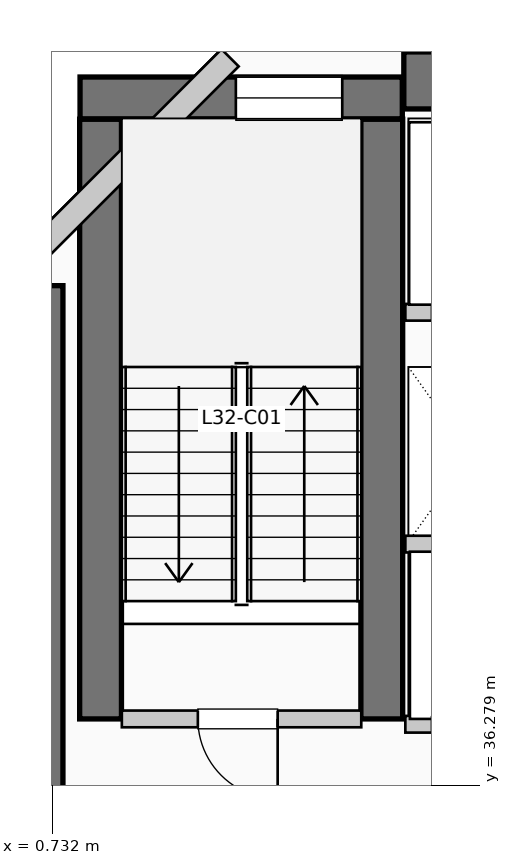
"""IFC4 building model, lengths in metres.
Left out: names, types, materials, properties, quantities, classifications, styles, units other than length and angle.
Written with IfcOpenShell. Run it as: python <this file> out.ifc"""

import sys

from ifc_helpers import new_model, si_unit, direction, frame, frame_2d, origin, place, context, subcontext, project, spatial, rectangle, extrude, element, fill, save


model = new_model("IFC4")
c1 = context("Model", 3, precision=1e-05, world=origin(), true_north=direction((0.0, 1.0)))
c2 = subcontext(c1, "Body", "Model", "MODEL_VIEW")
j1 = project(units=[si_unit("LENGTHUNIT", "METRE"), si_unit("PLANEANGLEUNIT", "RADIAN")], contexts=[c1])
p1 = place(None, origin())
s1 = spatial("IfcSite", under=j1, at=p1, CompositionType="ELEMENT")
p2 = place(p1, origin())
s2 = spatial("IfcBuilding", under=s1, at=p2, CompositionType="ELEMENT")
p3 = place(p2, frame((0.0, 0.0, 134.97)))
s3 = spatial("IfcBuildingStorey", under=s2, at=p3, CompositionType="ELEMENT", Elevation=134.97)
p4 = place(p3, frame((5.36, 45.55, 0.0), z_axis=(0.0, 0.0, 1.0), x_axis=(1.0, 0.0, 0.0)))
e1 = element("IfcWall", 1, at=p4, inside=s3, PredefinedType="SHEAR", context=c2, shape_type="SweptSolid", body=[
    extrude(rectangle(XDim=13.98, YDim=0.75, at=frame_2d((6.99, 0.0))), origin(), (0.0, 0.0, 1.0), 3.96),
])
p5 = place(p3, frame((0.5, 34.95, 0.0), z_axis=(0.0, 0.0, 1.0), x_axis=(0.0, 1.0, 0.0)))
e2 = element("IfcWall", 2, at=p5, inside=s3, PredefinedType="SHEAR", context=c2, shape_type="SweptSolid", body=[
    extrude(rectangle(XDim=7.9, YDim=0.75, at=frame_2d((3.95, 0.0))), origin(), (0.0, 0.0, 1.0), 3.96),
])
for number, where, z_axis, x_axis in (
    (3, (1.37, 37.15, 0.0), (0.0, 0.0, 1.0), (0.0, 1.0, 0.0)),
    (4, (5.07, 37.15, 0.0), (0.0, 0.0, 1.0), (0.0, 1.0, 0.0)),
):
    element("IfcWall", number, at=place(p3, frame(where, z_axis=z_axis, x_axis=x_axis)), inside=s3, PredefinedType="SHEAR", context=c2, shape_type="SweptSolid", body=[
        extrude(rectangle(XDim=7.89, YDim=0.55, at=frame_2d((3.945, 0.0))), origin(), (0.0, 0.0, 1.0), 3.96),
    ])
p6 = place(p3, frame((1.1, 45.32, 0.0), z_axis=(0.0, 0.0, 1.0), x_axis=(1.0, 0.0, 0.0)))
e5 = element("IfcWall", 5, at=p6, inside=s3, PredefinedType="SHEAR", context=c2, shape_type="SweptSolid", body=[
    extrude(rectangle(XDim=4.24, YDim=0.55, at=frame_2d((2.12, 0.0))), origin(), (0.0, 0.0, 1.0), 3.96),
])
p7 = place(p6, frame((2.05, 0.0, 1.05)))
e6 = element("IfcOpeningElement", 6, at=p7, cuts=e5, PredefinedType="OPENING", context=c2, shape_type="SweptSolid", body=[
    extrude(rectangle(XDim=1.4, YDim=1.8, at=frame_2d((0.7, 0.9))), frame((0.0, 0.285, 0.0), z_axis=(0.0, -1.0, 0.0), x_axis=(1.0, 0.0, 0.0)), (0.0, 0.0, 1.0), 0.57),
])
p8 = place(p3, frame((3.074, 45.848, 0.0), z_axis=(0.0, 0.0, 1.0), x_axis=(-0.707106781187, -0.707106781187, 0.0)))
e7 = element("IfcWall", 7, at=p8, inside=s3, PredefinedType="SOLIDWALL", context=c2, shape_type="SweptSolid", body=[
    extrude(rectangle(XDim=4.133, YDim=0.32, at=frame_2d((2.066, 0.0))), origin(), (0.0, 0.0, 1.0), 3.71),
])
p9 = place(p3, frame((1.65, 37.15, 0.0), z_axis=(0.0, 0.0, 1.0), x_axis=(1.0, 0.0, 0.0)))
e8 = element("IfcWall", 8, at=p9, inside=s3, PredefinedType="PARTITIONING", context=c2, shape_type="SweptSolid", body=[
    extrude(rectangle(XDim=3.15, YDim=0.22, at=frame_2d((1.575, 0.0))), origin(), (0.0, 0.0, 1.0), 3.71),
])
p10 = place(p9, frame((2.05, 0.0, 0.0), z_axis=(0.0, 0.0, 1.0), x_axis=(-1.0, 0.0, 0.0)))
e9 = element("IfcOpeningElement", 9, at=p10, cuts=e8, PredefinedType="OPENING", context=c2, shape_type="SweptSolid", body=[
    extrude(rectangle(XDim=1.05, YDim=2.15, at=frame_2d((0.525, 1.075))), frame((0.0, 0.12, 0.0), z_axis=(0.0, -1.0, 0.0), x_axis=(1.0, 0.0, 0.0)), (0.0, 0.0, 1.0), 0.24),
])
p11 = place(p3, frame((5.38, 37.08, 0.0), z_axis=(0.0, 0.0, 1.0), x_axis=(1.0, 0.0, 0.0)))
e10 = element("IfcWall", 10, at=p11, inside=s3, PredefinedType="PARTITIONING", context=c2, shape_type="SweptSolid", body=[
    extrude(rectangle(XDim=3.46, YDim=0.22, at=frame_2d((1.73, 0.0))), origin(), (0.0, 0.0, 1.0), 3.71),
])
p12 = place(p11, frame((1.55, 0.0, 0.0), z_axis=(0.0, 0.0, 1.0), x_axis=(-1.0, 0.0, 0.0)))
e11 = element("IfcOpeningElement", 11, at=p12, cuts=e10, PredefinedType="OPENING", context=c2, shape_type="SweptSolid", body=[
    extrude(rectangle(XDim=1.2, YDim=2.2, at=frame_2d((0.6, 1.1))), frame((0.0, 0.12, 0.0), z_axis=(0.0, -1.0, 0.0), x_axis=(1.0, 0.0, 0.0)), (0.0, 0.0, 1.0), 0.24),
])
p13 = place(p11, frame((3.22, 0.0, 0.0), z_axis=(0.0, 0.0, 1.0), x_axis=(-1.0, 0.0, 0.0)))
e12 = element("IfcOpeningElement", 12, at=p13, cuts=e10, PredefinedType="OPENING", context=c2, shape_type="SweptSolid", body=[
    extrude(rectangle(XDim=1.2, YDim=2.2, at=frame_2d((0.6, 1.1))), frame((0.0, 0.12, 0.0), z_axis=(0.0, -1.0, 0.0), x_axis=(1.0, 0.0, 0.0)), (0.0, 0.0, 1.0), 0.24),
])
p14 = place(p3, frame((5.38, 39.45, 0.0), z_axis=(0.0, 0.0, 1.0), x_axis=(1.0, 0.0, 0.0)))
e13 = element("IfcWall", 13, at=p14, inside=s3, PredefinedType="PARTITIONING", context=c2, shape_type="SweptSolid", body=[
    extrude(rectangle(XDim=3.46, YDim=0.22, at=frame_2d((1.73, 0.0))), origin(), (0.0, 0.0, 1.0), 3.71),
])
p15 = place(p3, frame((5.38, 42.5, 0.0), z_axis=(0.0, 0.0, 1.0), x_axis=(1.0, 0.0, 0.0)))
e14 = element("IfcWall", 14, at=p15, inside=s3, PredefinedType="PARTITIONING", context=c2, shape_type="SweptSolid", body=[
    extrude(rectangle(XDim=3.77, YDim=0.22, at=frame_2d((1.885, 0.0))), origin(), (0.0, 0.0, 1.0), 3.71),
])
p16 = place(p15, frame((1.75, 0.0, 0.0), z_axis=(0.0, 0.0, 1.0), x_axis=(-1.0, 0.0, 0.0)))
e15 = element("IfcOpeningElement", 15, at=p16, cuts=e14, PredefinedType="OPENING", context=c2, shape_type="SweptSolid", body=[
    extrude(rectangle(XDim=1.4, YDim=2.2, at=frame_2d((0.7, 1.1))), frame((0.0, 0.12, 0.0), z_axis=(0.0, -1.0, 0.0), x_axis=(1.0, 0.0, 0.0)), (0.0, 0.0, 1.0), 0.24),
])
p17 = place(p15, frame((3.53, 0.0, 0.0), z_axis=(0.0, 0.0, 1.0), x_axis=(-1.0, 0.0, 0.0)))
e16 = element("IfcOpeningElement", 16, at=p17, cuts=e14, PredefinedType="OPENING", context=c2, shape_type="SweptSolid", body=[
    extrude(rectangle(XDim=1.4, YDim=2.2, at=frame_2d((0.7, 1.1))), frame((0.0, 0.12, 0.0), z_axis=(0.0, -1.0, 0.0), x_axis=(1.0, 0.0, 0.0)), (0.0, 0.0, 1.0), 0.24),
])
p18 = place(p7, origin())
e17 = element("IfcWindow", 17, at=p18, inside=s3, PartitioningType="SINGLE_PANEL", PredefinedType="WINDOW", context=c2, shape_type="SweptSolid", body=[
    extrude(rectangle(XDim=1.4, YDim=1.8, at=frame_2d((0.7, 0.9))), frame((0.0, 0.03, 0.0), z_axis=(0.0, -1.0, 0.0), x_axis=(1.0, 0.0, 0.0)), (0.0, 0.0, 1.0), 0.06),
])
fill(e6, e17)
p19 = place(p10, origin())
e18 = element("IfcDoor", 18, at=p19, inside=s3, OperationType="SINGLE_SWING_RIGHT", PredefinedType="DOOR", context=c2, shape_type="SweptSolid", body=[
    extrude(rectangle(XDim=1.05, YDim=2.15, at=frame_2d((0.525, 1.075))), frame((0.0, 0.025, 0.0), z_axis=(0.0, -1.0, 0.0), x_axis=(1.0, 0.0, 0.0)), (0.0, 0.0, 1.0), 0.05),
])
fill(e9, e18)
save(model, sys.argv[1])
